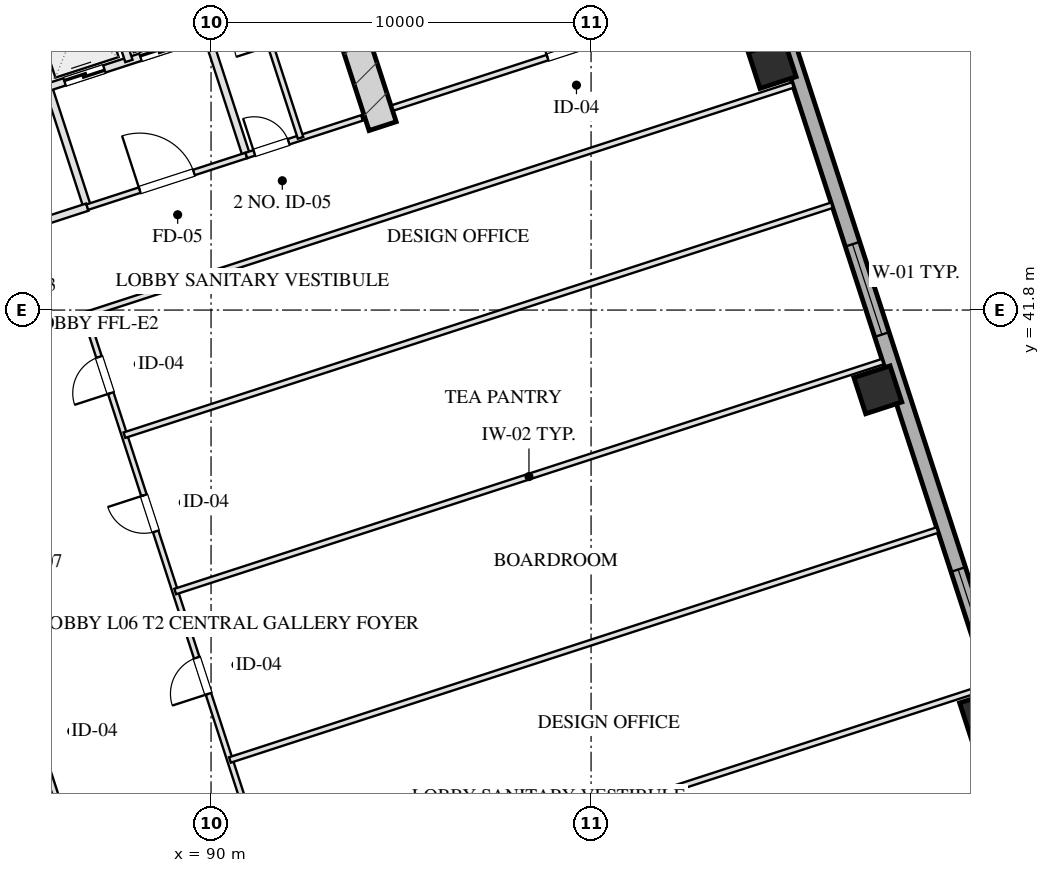
"""IFC4 building model, lengths in metres.
Left out: names, types, materials, properties, quantities, classifications, styles, units other than length and angle.
Written with IfcOpenShell. Run it as: python <this file> out.ifc"""

import sys

from ifc_helpers import new_model, si_unit, direction, frame, frame_2d, origin, origin_2d, place, context, subcontext, project, spatial, rectangle, hollow_rectangle, extrude, element, fill, save


model = new_model("IFC4")
c1 = context("Model", 3, precision=1e-05, world=origin(), true_north=direction((0.0, 1.0)))
c2 = subcontext(c1, "Body", "Model", "MODEL_VIEW")
j1 = project(units=[si_unit("LENGTHUNIT", "METRE"), si_unit("PLANEANGLEUNIT", "RADIAN")], contexts=[c1])
p1 = place(None, origin())
s1 = spatial("IfcSite", under=j1, at=p1, CompositionType="ELEMENT")
p2 = place(p1, origin())
s2 = spatial("IfcBuilding", under=s1, at=p2, CompositionType="ELEMENT")
p3 = place(p2, frame((0.0, 0.0, 30.0)))
s3 = spatial("IfcBuildingStorey", under=s2, at=p3, CompositionType="ELEMENT", Elevation=30.0)
p4 = place(p3, frame((94.515, 46.639, 0.0), z_axis=(0.0, 0.0, 1.0), x_axis=(-0.309016134813, 0.951056795583, 0.0)))
e1 = element("IfcWall", 1, at=p4, inside=s3, PredefinedType="SHEAR", context=c2, shape_type="SweptSolid", body=[
    extrude(rectangle(XDim=9.63, YDim=0.75, at=frame_2d((4.815, 0.0))), origin(), (0.0, 0.0, 1.0), 4.0),
])
for number, where, z_axis, x_axis in (
    (2, (110.328, 31.142, 0.0), (0.0, 0.0, 1.0), (0.951, 0.309, 0.0)),
    (3, (107.547, 39.701, 0.0), (0.0, 0.0, 1.0), (0.951, 0.309, 0.0)),
    (4, (104.766, 48.261, 0.0), (0.0, 0.0, 1.0), (0.951, 0.309, 0.0)),
):
    element("IfcColumn", number, at=place(p3, frame(where, z_axis=z_axis, x_axis=x_axis)), inside=s3, PredefinedType="COLUMN", context=c2, shape_type="SweptSolid", body=[
        extrude(hollow_rectangle(XDim=1.0, YDim=1.0, WallThickness=0.036, at=origin_2d()), origin(), (0.0, 0.0, 1.0), 4.001),
    ])
p5 = place(p3, frame((100.345, 63.648, 0.0), z_axis=(0.0, 0.0, 1.0), x_axis=(0.309014526607, -0.951057318118, 0.0)))
e5 = element("IfcWall", 5, at=p5, inside=s3, PredefinedType="SOLIDWALL", context=c2, shape_type="SweptSolid", body=[
    extrude(rectangle(XDim=50.0, YDim=0.4, at=frame_2d((25.0, 0.0))), origin(), (0.0, 0.0, 1.0), 3.16),
])
p6 = place(p5, frame((30.15, 0.0, 0.75)))
e6 = element("IfcOpeningElement", 6, at=p6, cuts=e5, PredefinedType="OPENING", context=c2, shape_type="SweptSolid", body=[
    extrude(rectangle(XDim=2.5, YDim=1.75, at=frame_2d((1.25, 0.875))), frame((0.0, 0.21, 0.0), z_axis=(0.0, -1.0, 0.0), x_axis=(1.0, 0.0, 0.0)), (0.0, 0.0, 1.0), 0.42),
])
p7 = place(p5, frame((21.15, 0.0, 0.75)))
e7 = element("IfcOpeningElement", 7, at=p7, cuts=e5, PredefinedType="OPENING", context=c2, shape_type="SweptSolid", body=[
    extrude(rectangle(XDim=2.5, YDim=1.75, at=frame_2d((1.25, 0.875))), frame((0.0, 0.21, 0.0), z_axis=(0.0, -1.0, 0.0), x_axis=(1.0, 0.0, 0.0)), (0.0, 0.0, 1.0), 0.42),
])
p8 = place(p3, frame((86.743, 44.508, 0.0), z_axis=(0.0, 0.0, 1.0), x_axis=(-0.309016001439, 0.951056838919, 0.0)))
e8 = element("IfcWall", 8, at=p8, inside=s3, PredefinedType="PARTITIONING", context=c2, shape_type="SweptSolid", body=[
    extrude(rectangle(XDim=8.43, YDim=0.2, at=frame_2d((4.215, 0.0))), origin(), (0.0, 0.0, 1.0), 3.725),
])
p9 = place(p3, frame((83.101, 43.324, 0.0), z_axis=(0.0, 0.0, 1.0), x_axis=(0.951052804469, 0.309028417967, 0.0)))
e9 = element("IfcWall", 9, at=p9, inside=s3, PredefinedType="PARTITIONING", context=c2, shape_type="SweptSolid", body=[
    extrude(rectangle(XDim=3.83, YDim=0.2, at=frame_2d((1.915, 0.0))), origin(), (0.0, 0.0, 1.0), 3.725),
])
p10 = place(p9, frame((1.35, 0.0, 0.0)))
e10 = element("IfcOpeningElement", 10, at=p10, cuts=e9, PredefinedType="OPENING", context=c2, shape_type="SweptSolid", body=[
    extrude(rectangle(XDim=1.2, YDim=2.05, at=frame_2d((0.6, 1.025))), frame((0.0, 0.11, 0.0), z_axis=(0.0, -1.0, 0.0), x_axis=(1.0, 0.0, 0.0)), (0.0, 0.0, 1.0), 0.22),
])
p11 = place(p3, frame((90.928, 45.868, 0.0), z_axis=(0.0, 0.0, 1.0), x_axis=(-0.309042196757, 0.951048327176, 0.0)))
e11 = element("IfcWall", 11, at=p11, inside=s3, PredefinedType="PARTITIONING", context=c2, shape_type="SweptSolid", body=[
    extrude(rectangle(XDim=8.43, YDim=0.2, at=frame_2d((4.215, 0.0))), origin(), (0.0, 0.0, 1.0), 3.725),
])
p12 = place(p3, frame((86.743, 44.508, 0.0), z_axis=(0.0, 0.0, 1.0), x_axis=(0.951063829732, 0.308994485023, 0.0)))
e12 = element("IfcWall", 12, at=p12, inside=s3, PredefinedType="PARTITIONING", context=c2, shape_type="SweptSolid", body=[
    extrude(rectangle(XDim=4.4, YDim=0.15, at=frame_2d((2.2, 0.0))), origin(), (0.0, 0.0, 1.0), 3.725),
])
p13 = place(p12, frame((1.45, 0.0, 0.0)))
e13 = element("IfcOpeningElement", 13, at=p13, cuts=e12, PredefinedType="OPENING", context=c2, shape_type="SweptSolid", body=[
    extrude(rectangle(XDim=1.5, YDim=2.05, at=frame_2d((0.75, 1.025))), frame((0.0, 0.085, 0.0), z_axis=(0.0, -1.0, 0.0), x_axis=(1.0, 0.0, 0.0)), (0.0, 0.0, 1.0), 0.17),
])
p14 = place(p3, frame((85.718, 47.666, 0.0), z_axis=(0.0, 0.0, 1.0), x_axis=(0.951058531764, 0.30901079133, 0.0)))
e14 = element("IfcWall", 14, at=p14, inside=s3, PredefinedType="PARTITIONING", context=c2, shape_type="SweptSolid", body=[
    extrude(rectangle(XDim=4.4, YDim=0.2, at=frame_2d((2.2, 0.0))), origin(), (0.0, 0.0, 1.0), 3.725),
])
p15 = place(p14, frame((0.45, 0.0, 0.0)))
e15 = element("IfcOpeningElement", 15, at=p15, cuts=e14, PredefinedType="OPENING", context=c2, shape_type="SweptSolid", body=[
    extrude(rectangle(XDim=1.1, YDim=2.05, at=frame_2d((0.55, 1.025))), frame((0.0, 0.11, 0.0), z_axis=(0.0, -1.0, 0.0), x_axis=(1.0, 0.0, 0.0)), (0.0, 0.0, 1.0), 0.22),
])
p16 = place(p14, frame((2.55, 0.0, 0.0)))
e16 = element("IfcOpeningElement", 16, at=p16, cuts=e14, PredefinedType="OPENING", context=c2, shape_type="SweptSolid", body=[
    extrude(rectangle(XDim=1.1, YDim=2.05, at=frame_2d((0.55, 1.025))), frame((0.0, 0.11, 0.0), z_axis=(0.0, -1.0, 0.0), x_axis=(1.0, 0.0, 0.0)), (0.0, 0.0, 1.0), 0.22),
])
p17 = place(p3, frame((87.838, 48.354, 0.0), z_axis=(0.0, 0.0, 1.0), x_axis=(-0.3090093719, 0.951058992953, 0.0)))
e17 = element("IfcWall", 17, at=p17, inside=s3, PredefinedType="PARTITIONING", context=c2, shape_type="SweptSolid", body=[
    extrude(rectangle(XDim=5.11, YDim=0.2, at=frame_2d((2.555, 0.0))), origin(), (0.0, 0.0, 1.0), 3.725),
])
p18 = place(p3, frame((90.928, 45.868, 0.0), z_axis=(0.0, 0.0, 1.0), x_axis=(0.951059297078, 0.309008435874, 0.0)))
e18 = element("IfcWall", 18, at=p18, inside=s3, PredefinedType="PARTITIONING", context=c2, shape_type="SweptSolid", body=[
    extrude(rectangle(XDim=3.2, YDim=0.15, at=frame_2d((1.6, 0.0))), origin(), (0.0, 0.0, 1.0), 3.725),
])
p19 = place(p18, frame((0.22, 0.0, 0.0)))
e19 = element("IfcOpeningElement", 19, at=p19, cuts=e18, PredefinedType="OPENING", context=c2, shape_type="SweptSolid", body=[
    extrude(rectangle(XDim=0.95, YDim=2.05, at=frame_2d((0.475, 1.025))), frame((0.0, 0.085, 0.0), z_axis=(0.0, -1.0, 0.0), x_axis=(1.0, 0.0, 0.0)), (0.0, 0.0, 1.0), 0.17),
])
p20 = place(p3, frame((92.355, 46.331, 0.0), z_axis=(0.0, 0.0, 1.0), x_axis=(-0.309007490203, 0.951059604335, 0.0)))
e20 = element("IfcWall", 20, at=p20, inside=s3, PredefinedType="PARTITIONING", context=c2, shape_type="SweptSolid", body=[
    extrude(rectangle(XDim=8.43, YDim=0.15, at=frame_2d((4.215, 0.0))), origin(), (0.0, 0.0, 1.0), 3.725),
])
p21 = place(p20, frame((2.55, 0.0, 0.0)))
e21 = element("IfcOpeningElement", 21, at=p21, cuts=e20, PredefinedType="OPENING", context=c2, shape_type="SweptSolid", body=[
    extrude(rectangle(XDim=0.95, YDim=2.05, at=frame_2d((0.475, 1.025))), frame((0.0, 0.085, 0.0), z_axis=(0.0, -1.0, 0.0), x_axis=(1.0, 0.0, 0.0)), (0.0, 0.0, 1.0), 0.17),
])
p22 = place(p20, frame((4.7, 0.0, 0.0)))
e22 = element("IfcOpeningElement", 22, at=p22, cuts=e20, PredefinedType="OPENING", context=c2, shape_type="SweptSolid", body=[
    extrude(rectangle(XDim=0.9, YDim=2.05, at=frame_2d((0.45, 1.025))), frame((0.0, 0.085, 0.0), z_axis=(0.0, -1.0, 0.0), x_axis=(1.0, 0.0, 0.0)), (0.0, 0.0, 1.0), 0.17),
])
p23 = place(p20, frame((6.8, 0.0, 0.0)))
e23 = element("IfcOpeningElement", 23, at=p23, cuts=e20, PredefinedType="OPENING", context=c2, shape_type="SweptSolid", body=[
    extrude(rectangle(XDim=0.9, YDim=2.05, at=frame_2d((0.45, 1.025))), frame((0.0, 0.085, 0.0), z_axis=(0.0, -1.0, 0.0), x_axis=(1.0, 0.0, 0.0)), (0.0, 0.0, 1.0), 0.17),
])
p24 = place(p3, frame((101.578, 26.196, 0.0), z_axis=(0.0, 0.0, 1.0), x_axis=(0.951059043131, 0.309009217467, 0.0)))
e24 = element("IfcWall", 24, at=p24, inside=s3, PredefinedType="PARTITIONING", context=c2, shape_type="SweptSolid", body=[
    extrude(rectangle(XDim=10.2, YDim=0.15, at=frame_2d((5.1, 0.0))), origin(), (0.0, 0.0, 1.0), 3.725),
])
p25 = place(p24, frame((4.284, 0.0, 0.0)))
e25 = element("IfcOpeningElement", 25, at=p25, cuts=e24, PredefinedType="OPENING", context=c2, shape_type="SweptSolid", body=[
    extrude(rectangle(XDim=1.0, YDim=2.05, at=frame_2d((0.5, 1.025))), frame((0.0, 0.085, 0.0), z_axis=(0.0, -1.0, 0.0), x_axis=(1.0, 0.0, 0.0)), (0.0, 0.0, 1.0), 0.17),
])
p26 = place(p3, frame((94.78, 47.119, 0.0), z_axis=(0.0, 0.0, 1.0), x_axis=(0.951054294345, 0.309023832749, 0.0)))
e26 = element("IfcWall", 26, at=p26, inside=s3, PredefinedType="PARTITIONING", context=c2, shape_type="SweptSolid", body=[
    extrude(rectangle(XDim=10.2, YDim=0.15, at=frame_2d((5.1, 0.0))), origin(), (0.0, 0.0, 1.0), 3.725),
])
p27 = place(p26, frame((4.284, 0.0, 0.0)))
e27 = element("IfcOpeningElement", 27, at=p27, cuts=e26, PredefinedType="OPENING", context=c2, shape_type="SweptSolid", body=[
    extrude(rectangle(XDim=1.0, YDim=2.05, at=frame_2d((0.5, 1.025))), frame((0.0, 0.085, 0.0), z_axis=(0.0, -1.0, 0.0), x_axis=(1.0, 0.0, 0.0)), (0.0, 0.0, 1.0), 0.17),
])
for number, where, z_axis, x_axis in (
    (28, (91.834, 25.848, 0.0), (0.0, 0.0, 1.0), (0.951, 0.309, 0.0)),
    (29, (86.692, 41.673, 0.0), (0.0, 0.0, 1.0), (0.951, 0.309, 0.0)),
):
    element("IfcWall", number, at=place(p3, frame(where, z_axis=z_axis, x_axis=x_axis)), inside=s3, PredefinedType="PARTITIONING", context=c2, shape_type="SweptSolid", body=[
        extrude(rectangle(XDim=19.575, YDim=0.15, at=frame_2d((9.788, 0.0))), origin(), (0.0, 0.0, 1.0), 3.725),
    ])
p28 = place(p3, frame((87.412, 24.411, 0.0), z_axis=(0.0, 0.0, 1.0), x_axis=(-0.309022042254, 0.951054876125, 0.0)))
e30 = element("IfcWall", 30, at=p28, inside=s3, PredefinedType="PARTITIONING", context=c2, shape_type="SweptSolid", body=[
    extrude(rectangle(XDim=16.64, YDim=0.15, at=frame_2d((8.32, 0.0))), origin(), (0.0, 0.0, 1.0), 3.725),
])
p29 = place(p28, frame((1.33, 0.0, 0.0)))
e31 = element("IfcOpeningElement", 31, at=p29, cuts=e30, PredefinedType="OPENING", context=c2, shape_type="SweptSolid", body=[
    extrude(rectangle(XDim=1.0, YDim=2.05, at=frame_2d((0.5, 1.025))), frame((0.0, 0.085, 0.0), z_axis=(0.0, -1.0, 0.0), x_axis=(1.0, 0.0, 0.0)), (0.0, 0.0, 1.0), 0.17),
])
p30 = place(p28, frame((5.83, 0.0, 0.0)))
e32 = element("IfcOpeningElement", 32, at=p30, cuts=e30, PredefinedType="OPENING", context=c2, shape_type="SweptSolid", body=[
    extrude(rectangle(XDim=1.0, YDim=2.05, at=frame_2d((0.5, 1.025))), frame((0.0, 0.085, 0.0), z_axis=(0.0, -1.0, 0.0), x_axis=(1.0, 0.0, 0.0)), (0.0, 0.0, 1.0), 0.17),
])
p31 = place(p28, frame((10.49, 0.0, 0.0)))
e33 = element("IfcOpeningElement", 33, at=p31, cuts=e30, PredefinedType="OPENING", context=c2, shape_type="SweptSolid", body=[
    extrude(rectangle(XDim=1.05, YDim=2.05, at=frame_2d((0.525, 1.025))), frame((0.0, 0.085, 0.0), z_axis=(0.0, -1.0, 0.0), x_axis=(1.0, 0.0, 0.0)), (0.0, 0.0, 1.0), 0.17),
])
p32 = place(p28, frame((14.31, 0.0, 0.0)))
e34 = element("IfcOpeningElement", 34, at=p32, cuts=e30, PredefinedType="OPENING", context=c2, shape_type="SweptSolid", body=[
    extrude(rectangle(XDim=1.0, YDim=2.05, at=frame_2d((0.5, 1.025))), frame((0.0, 0.085, 0.0), z_axis=(0.0, -1.0, 0.0), x_axis=(1.0, 0.0, 0.0)), (0.0, 0.0, 1.0), 0.17),
])
p33 = place(p3, frame((91.834, 25.848, 0.0), z_axis=(0.0, 0.0, 1.0), x_axis=(-0.30901773025, 0.951056277195, 0.0)))
e35 = element("IfcWall", 35, at=p33, inside=s3, PredefinedType="PARTITIONING", context=c2, shape_type="SweptSolid", body=[
    extrude(rectangle(XDim=16.64, YDim=0.15, at=frame_2d((8.32, 0.0))), origin(), (0.0, 0.0, 1.0), 3.725),
])
p34 = place(p33, frame((1.663, 0.0, 0.0)))
e36 = element("IfcOpeningElement", 36, at=p34, cuts=e35, PredefinedType="OPENING", context=c2, shape_type="SweptSolid", body=[
    extrude(rectangle(XDim=1.0, YDim=2.05, at=frame_2d((0.5, 1.025))), frame((0.0, 0.085, 0.0), z_axis=(0.0, -1.0, 0.0), x_axis=(1.0, 0.0, 0.0)), (0.0, 0.0, 1.0), 0.17),
])
p35 = place(p33, frame((6.156, 0.0, 0.0)))
e37 = element("IfcOpeningElement", 37, at=p35, cuts=e35, PredefinedType="OPENING", context=c2, shape_type="SweptSolid", body=[
    extrude(rectangle(XDim=1.0, YDim=2.05, at=frame_2d((0.5, 1.025))), frame((0.0, 0.085, 0.0), z_axis=(0.0, -1.0, 0.0), x_axis=(1.0, 0.0, 0.0)), (0.0, 0.0, 1.0), 0.17),
])
p36 = place(p33, frame((10.649, 0.0, 0.0)))
e38 = element("IfcOpeningElement", 38, at=p36, cuts=e35, PredefinedType="OPENING", context=c2, shape_type="SweptSolid", body=[
    extrude(rectangle(XDim=1.0, YDim=2.05, at=frame_2d((0.5, 1.025))), frame((0.0, 0.085, 0.0), z_axis=(0.0, -1.0, 0.0), x_axis=(1.0, 0.0, 0.0)), (0.0, 0.0, 1.0), 0.17),
])
p37 = place(p33, frame((14.476, 0.0, 0.0)))
e39 = element("IfcOpeningElement", 39, at=p37, cuts=e35, PredefinedType="OPENING", context=c2, shape_type="SweptSolid", body=[
    extrude(rectangle(XDim=1.0, YDim=2.05, at=frame_2d((0.5, 1.025))), frame((0.0, 0.085, 0.0), z_axis=(0.0, -1.0, 0.0), x_axis=(1.0, 0.0, 0.0)), (0.0, 0.0, 1.0), 0.17),
])
for number, where, z_axis, x_axis in (
    (40, (90.497, 29.962, 0.0), (0.0, 0.0, 1.0), (0.951, 0.309, 0.0)),
    (41, (89.057, 34.394, 0.0), (0.0, 0.0, 1.0), (0.951, 0.309, 0.0)),
    (42, (87.72, 38.508, 0.0), (0.0, 0.0, 1.0), (0.951, 0.309, 0.0)),
):
    element("IfcWall", number, at=place(p3, frame(where, z_axis=z_axis, x_axis=x_axis)), inside=s3, PredefinedType="PARTITIONING", context=c2, shape_type="SweptSolid", body=[
        extrude(rectangle(XDim=19.575, YDim=0.15, at=frame_2d((9.788, 0.0))), origin(), (0.0, 0.0, 1.0), 3.725),
    ])
p38 = place(p6, origin())
e43 = element("IfcWindow", 43, at=p38, inside=s3, PartitioningType="TRIPLE_PANEL_VERTICAL", PredefinedType="WINDOW", context=c2, shape_type="SweptSolid", body=[
    extrude(rectangle(XDim=2.5, YDim=1.75, at=frame_2d((1.25, 0.875))), frame((0.0, 0.03, 0.0), z_axis=(0.0, -1.0, 0.0), x_axis=(1.0, 0.0, 0.0)), (0.0, 0.0, 1.0), 0.06),
])
fill(e6, e43)
p39 = place(p7, origin())
e44 = element("IfcWindow", 44, at=p39, inside=s3, PartitioningType="TRIPLE_PANEL_VERTICAL", PredefinedType="WINDOW", context=c2, shape_type="SweptSolid", body=[
    extrude(rectangle(XDim=2.5, YDim=1.75, at=frame_2d((1.25, 0.875))), frame((0.0, 0.03, 0.0), z_axis=(0.0, -1.0, 0.0), x_axis=(1.0, 0.0, 0.0)), (0.0, 0.0, 1.0), 0.06),
])
fill(e7, e44)
p40 = place(p13, origin())
e45 = element("IfcDoor", 45, at=p40, inside=s3, OperationType="SINGLE_SWING_LEFT", PredefinedType="DOOR", context=c2, shape_type="SweptSolid", body=[
    extrude(rectangle(XDim=1.5, YDim=2.05, at=frame_2d((0.75, 1.025))), frame((0.0, 0.025, 0.0), z_axis=(0.0, -1.0, 0.0), x_axis=(1.0, 0.0, 0.0)), (0.0, 0.0, 1.0), 0.05),
])
fill(e13, e45)
p41 = place(p15, origin())
e46 = element("IfcDoor", 46, at=p41, inside=s3, OperationType="DOUBLE_DOOR_SLIDING", PredefinedType="DOOR", context=c2, shape_type="SweptSolid", body=[
    extrude(rectangle(XDim=1.1, YDim=2.05, at=frame_2d((0.55, 1.025))), frame((0.0, 0.025, 0.0), z_axis=(0.0, -1.0, 0.0), x_axis=(1.0, 0.0, 0.0)), (0.0, 0.0, 1.0), 0.05),
])
fill(e15, e46)
p42 = place(p16, origin())
e47 = element("IfcDoor", 47, at=p42, inside=s3, OperationType="DOUBLE_DOOR_SLIDING", PredefinedType="DOOR", context=c2, shape_type="SweptSolid", body=[
    extrude(rectangle(XDim=1.1, YDim=2.05, at=frame_2d((0.55, 1.025))), frame((0.0, 0.025, 0.0), z_axis=(0.0, -1.0, 0.0), x_axis=(1.0, 0.0, 0.0)), (0.0, 0.0, 1.0), 0.05),
])
fill(e16, e47)
p43 = place(p19, origin())
e48 = element("IfcDoor", 48, at=p43, inside=s3, OperationType="SINGLE_SWING_LEFT", PredefinedType="DOOR", context=c2, shape_type="SweptSolid", body=[
    extrude(rectangle(XDim=0.95, YDim=2.05, at=frame_2d((0.475, 1.025))), frame((0.0, 0.025, 0.0), z_axis=(0.0, -1.0, 0.0), x_axis=(1.0, 0.0, 0.0)), (0.0, 0.0, 1.0), 0.05),
])
fill(e19, e48)
p44 = place(p27, origin())
e49 = element("IfcDoor", 49, at=p44, inside=s3, OperationType="SINGLE_SWING_LEFT", PredefinedType="DOOR", context=c2, shape_type="SweptSolid", body=[
    extrude(rectangle(XDim=1.0, YDim=2.05, at=frame_2d((0.5, 1.025))), frame((0.0, 0.025, 0.0), z_axis=(0.0, -1.0, 0.0), x_axis=(1.0, 0.0, 0.0)), (0.0, 0.0, 1.0), 0.05),
])
fill(e27, e49)
p45 = place(p35, origin())
e50 = element("IfcDoor", 50, at=p45, inside=s3, OperationType="SINGLE_SWING_LEFT", PredefinedType="DOOR", context=c2, shape_type="SweptSolid", body=[
    extrude(rectangle(XDim=1.0, YDim=2.05, at=frame_2d((0.5, 1.025))), frame((0.0, 0.025, 0.0), z_axis=(0.0, -1.0, 0.0), x_axis=(1.0, 0.0, 0.0)), (0.0, 0.0, 1.0), 0.05),
])
fill(e37, e50)
p46 = place(p36, origin())
e51 = element("IfcDoor", 51, at=p46, inside=s3, OperationType="SINGLE_SWING_RIGHT", PredefinedType="DOOR", context=c2, shape_type="SweptSolid", body=[
    extrude(rectangle(XDim=1.0, YDim=2.05, at=frame_2d((0.5, 1.025))), frame((0.0, 0.025, 0.0), z_axis=(0.0, -1.0, 0.0), x_axis=(1.0, 0.0, 0.0)), (0.0, 0.0, 1.0), 0.05),
])
fill(e38, e51)
p47 = place(p37, origin())
e52 = element("IfcDoor", 52, at=p47, inside=s3, OperationType="SINGLE_SWING_LEFT", PredefinedType="DOOR", context=c2, shape_type="SweptSolid", body=[
    extrude(rectangle(XDim=1.0, YDim=2.05, at=frame_2d((0.5, 1.025))), frame((0.0, 0.025, 0.0), z_axis=(0.0, -1.0, 0.0), x_axis=(1.0, 0.0, 0.0)), (0.0, 0.0, 1.0), 0.05),
])
fill(e39, e52)
save(model, sys.argv[1])
